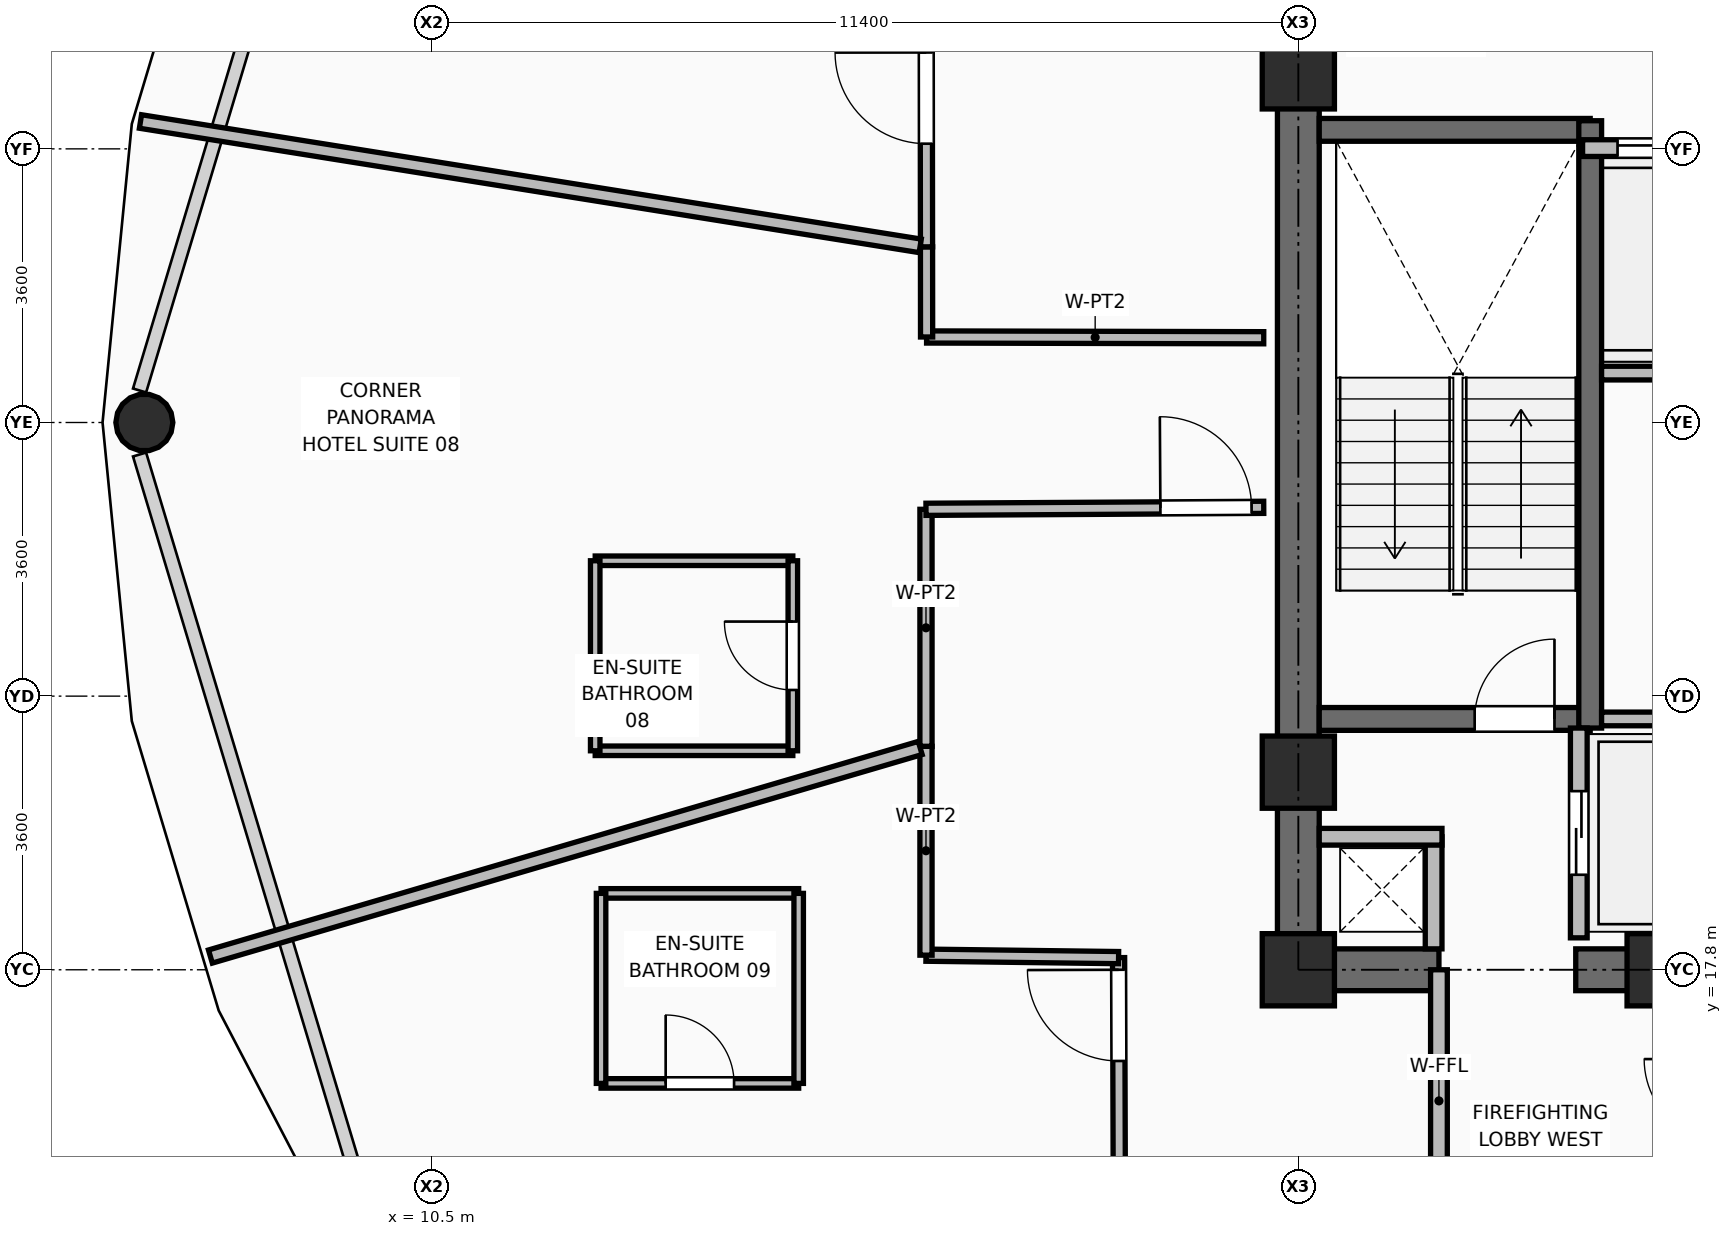
"""IFC4 building model, lengths in metres.
Left out: names, types, materials, properties, quantities, classifications, styles, units other than length and angle.
Written with IfcOpenShell. Run it as: python <this file> out.ifc"""

import sys

from ifc_helpers import new_model, si_unit, direction, frame, frame_2d, origin, origin_2d, place, context, subcontext, project, spatial, rectangle, hollow_circle, extrude, element, fill, save


model = new_model("IFC4")
c1 = context("Model", 3, precision=1e-05, world=origin(), true_north=direction((0.0, 1.0)))
c2 = subcontext(c1, "Body", "Model", "MODEL_VIEW")
j1 = project(units=[si_unit("LENGTHUNIT", "METRE"), si_unit("PLANEANGLEUNIT", "RADIAN")], contexts=[c1])
p1 = place(None, origin())
s1 = spatial("IfcSite", under=j1, at=p1, CompositionType="ELEMENT")
p2 = place(p1, origin())
s2 = spatial("IfcBuilding", under=s1, at=p2, CompositionType="ELEMENT")
p3 = place(p2, frame((0.0, 0.0, 157.2)))
s3 = spatial("IfcBuildingStorey", under=s2, at=p3, CompositionType="ELEMENT", Elevation=157.2)
for number, where, z_axis, x_axis in (
    (1, (21.9, 17.8, 0.0), (0.0, 0.0, 1.0), (1.0, 0.0, 0.0)),
    (2, (26.7, 17.8, 0.0), (0.0, 0.0, 1.0), (1.0, 0.0, 0.0)),
    (3, (21.9, 20.4, 0.0), (0.0, 0.0, 1.0), (1.0, 0.0, 0.0)),
    (4, (21.9, 29.6, 0.0), (0.0, 0.0, 1.0), (1.0, 0.0, 0.0)),
):
    element("IfcColumn", number, at=place(p3, frame(where, z_axis=z_axis, x_axis=x_axis)), inside=s3, PredefinedType="COLUMN", context=c2, shape_type="SweptSolid", body=[
        extrude(rectangle(XDim=0.95, YDim=0.95, at=origin_2d()), origin(), (0.0, 0.0, 1.0), 3.75),
    ])
p4 = place(p3, frame((6.717, 25.0, 0.0), z_axis=(0.0, 0.0, 1.0), x_axis=(1.0, 0.0, 0.0)))
e5 = element("IfcColumn", 5, at=p4, inside=s3, PredefinedType="COLUMN", context=c2, shape_type="SweptSolid", body=[
    extrude(hollow_circle(Radius=0.375, WallThickness=0.035, at=origin_2d()), origin(), (0.0, 0.0, 1.0), 3.57),
])
p5 = place(p3, frame((21.625, 17.8, 0.0), z_axis=(0.0, 0.0, 1.0), x_axis=(1.0, 0.0, 0.0)))
e6 = element("IfcWall", 6, at=p5, inside=s3, PredefinedType="SHEAR", context=c2, shape_type="SweptSolid", body=[
    extrude(rectangle(XDim=2.125, YDim=0.55, at=frame_2d((1.062, 0.0))), origin(), (0.0, 0.0, 1.0), 3.57),
])
p6 = place(p3, frame((25.55, 17.8, 0.0), z_axis=(0.0, 0.0, 1.0), x_axis=(1.0, 0.0, 0.0)))
e7 = element("IfcWall", 7, at=p6, inside=s3, PredefinedType="SHEAR", context=c2, shape_type="SweptSolid", body=[
    extrude(rectangle(XDim=6.9, YDim=0.55, at=frame_2d((3.45, 0.0))), origin(), (0.0, 0.0, 1.0), 3.57),
])
p7 = place(p3, frame((21.9, 18.075, 0.0), z_axis=(0.0, 0.0, 1.0), x_axis=(0.0, 1.0, 0.0)))
e8 = element("IfcWall", 8, at=p7, inside=s3, PredefinedType="SHEAR", context=c2, shape_type="SweptSolid", body=[
    extrude(rectangle(XDim=14.1, YDim=0.55, at=frame_2d((7.05, 0.0))), origin(), (0.0, 0.0, 1.0), 3.57),
])
p8 = place(p3, frame((22.175, 21.1, 0.0), z_axis=(0.0, 0.0, 1.0), x_axis=(1.0, 0.0, 0.0)))
e9 = element("IfcWall", 9, at=p8, inside=s3, PredefinedType="SHEAR", context=c2, shape_type="SweptSolid", body=[
    extrude(rectangle(XDim=3.565, YDim=0.3, at=frame_2d((1.782, 0.0))), origin(), (0.0, 0.0, 1.0), 3.57),
])
p9 = place(p8, frame((2.045, 0.0, 0.0)))
e10 = element("IfcOpeningElement", 10, at=p9, cuts=e9, PredefinedType="OPENING", context=c2, shape_type="SweptSolid", body=[
    extrude(rectangle(XDim=1.05, YDim=2.1, at=frame_2d((0.525, 1.05))), frame((0.0, 0.16, 0.0), z_axis=(0.0, -1.0, 0.0), x_axis=(1.0, 0.0, 0.0)), (0.0, 0.0, 1.0), 0.32),
])
p10 = place(p3, frame((22.175, 28.85, 0.0), z_axis=(0.0, 0.0, 1.0), x_axis=(1.0, 0.0, 0.0)))
e11 = element("IfcWall", 11, at=p10, inside=s3, PredefinedType="SHEAR", context=c2, shape_type="SweptSolid", body=[
    extrude(rectangle(XDim=3.565, YDim=0.3, at=frame_2d((1.782, 0.0))), origin(), (0.0, 0.0, 1.0), 3.57),
])
p11 = place(p3, frame((25.74, 20.98, 0.0), z_axis=(0.0, 0.0, 1.0), x_axis=(0.0, 1.0, 0.0)))
e12 = element("IfcWall", 12, at=p11, inside=s3, PredefinedType="SHEAR", context=c2, shape_type="SweptSolid", body=[
    extrude(rectangle(XDim=7.99, YDim=0.3, at=frame_2d((3.995, 0.0))), origin(), (0.0, 0.0, 1.0), 3.57),
])
p12 = place(p3, frame((23.68, 18.075, 0.0), z_axis=(0.0, 0.0, 1.0), x_axis=(0.0, 1.0, 0.0)))
e13 = element("IfcWall", 13, at=p12, inside=s3, PredefinedType="PARTITIONING", context=c2, shape_type="SweptSolid", body=[
    extrude(rectangle(XDim=1.475, YDim=0.22, at=frame_2d((0.738, 0.0))), origin(), (0.0, 0.0, 1.0), 3.55),
])
p13 = place(p3, frame((22.175, 19.55, 0.0), z_axis=(0.0, 0.0, 1.0), x_axis=(1.0, 0.0, 0.0)))
e14 = element("IfcWall", 14, at=p13, inside=s3, PredefinedType="PARTITIONING", context=c2, shape_type="SweptSolid", body=[
    extrude(rectangle(XDim=1.615, YDim=0.22, at=frame_2d((0.808, 0.0))), origin(), (0.0, 0.0, 1.0), 2.595),
])
p14 = place(p3, frame((25.59, 18.22, 0.0), z_axis=(0.0, 0.0, 1.0), x_axis=(0.0, 1.0, 0.0)))
e15 = element("IfcWall", 15, at=p14, inside=s3, PredefinedType="PARTITIONING", context=c2, shape_type="SweptSolid", body=[
    extrude(rectangle(XDim=2.76, YDim=0.22, at=frame_2d((1.38, 0.0))), origin(), (0.0, 0.0, 1.0), 3.55),
])
p15 = place(p14, frame((0.83, 0.0, 0.0)))
e16 = element("IfcOpeningElement", 16, at=p15, cuts=e15, PredefinedType="OPENING", context=c2, shape_type="SweptSolid", body=[
    extrude(rectangle(XDim=1.1, YDim=2.2, at=frame_2d((0.55, 1.1))), frame((0.0, 0.12, 0.0), z_axis=(0.0, -1.0, 0.0), x_axis=(1.0, 0.0, 0.0)), (0.0, 0.0, 1.0), 0.24),
])
p16 = place(p3, frame((25.64, 28.61, 0.0), z_axis=(0.0, 0.0, 1.0), x_axis=(1.0, 0.0, 0.0)))
e17 = element("IfcWall", 17, at=p16, inside=s3, PredefinedType="PARTITIONING", context=c2, shape_type="SweptSolid", body=[
    extrude(rectangle(XDim=2.02, YDim=0.22, at=frame_2d((1.01, 0.0))), origin(), (0.0, 0.0, 1.0), 3.55),
])
p17 = place(p16, frame((0.46, 0.0, 0.0)))
e18 = element("IfcOpeningElement", 18, at=p17, cuts=e17, PredefinedType="OPENING", context=c2, shape_type="SweptSolid", body=[
    extrude(rectangle(XDim=1.1, YDim=2.2, at=frame_2d((0.55, 1.1))), frame((0.0, 0.12, 0.0), z_axis=(0.0, -1.0, 0.0), x_axis=(1.0, 0.0, 0.0)), (0.0, 0.0, 1.0), 0.24),
])
for number, where, z_axis, x_axis in (
    (19, (25.89, 21.1, 0.0), (0.0, 0.0, 1.0), (1.0, 0.0, 0.0)),
    (20, (25.89, 25.65, 0.0), (0.0, 0.0, 1.0), (1.0, 0.0, 0.0)),
):
    element("IfcWall", number, at=place(p3, frame(where, z_axis=z_axis, x_axis=x_axis)), inside=s3, PredefinedType="PARTITIONING", context=c2, shape_type="SweptSolid", body=[
        extrude(rectangle(XDim=1.7, YDim=0.18, at=frame_2d((0.85, 0.0))), origin(), (0.0, 0.0, 1.0), 3.55),
    ])
p18 = place(p3, frame((23.75, 14.35, 0.0), z_axis=(0.0, 0.0, 1.0), x_axis=(0.0, 1.0, 0.0)))
e21 = element("IfcWall", 21, at=p18, inside=s3, PredefinedType="PARTITIONING", context=c2, shape_type="SweptSolid", body=[
    extrude(rectangle(XDim=3.45, YDim=0.22, at=frame_2d((1.725, 0.0))), origin(), (0.0, 0.0, 1.0), 3.006),
])
p19 = place(p3, frame((21.445, 26.115, 0.0), z_axis=(0.0, 0.0, 1.0), x_axis=(-0.999997454189, 0.002256460959, 0.0)))
e22 = element("IfcWall", 22, at=p19, inside=s3, PredefinedType="PARTITIONING", context=c2, shape_type="SweptSolid", body=[
    extrude(rectangle(XDim=4.436, YDim=0.16, at=frame_2d((2.218, 0.0))), origin(), (0.0, 0.0, 1.0), 2.595),
])
p20 = place(p3, frame((17.009, 26.125, 0.0), z_axis=(0.0, 0.0, 1.0), x_axis=(-0.00082338383, 0.999999661019, 0.0)))
e23 = element("IfcWall", 23, at=p20, inside=s3, PredefinedType="PARTITIONING", context=c2, shape_type="SweptSolid", body=[
    extrude(rectangle(XDim=1.186, YDim=0.16, at=frame_2d((0.593, 0.0))), origin(), (0.0, 0.0, 1.0), 3.55),
])
p21 = place(p3, frame((17.008, 27.311, 0.0), z_axis=(0.0, 0.0, 1.0), x_axis=(-0.001309879116, 0.999999142108, 0.0)))
e24 = element("IfcWall", 24, at=p21, inside=s3, PredefinedType="PARTITIONING", context=c2, shape_type="SweptSolid", body=[
    extrude(rectangle(XDim=3.914, YDim=0.16, at=frame_2d((1.957, 0.0))), origin(), (0.0, 0.0, 1.0), 3.55),
])
p22 = place(p21, frame((1.357, 0.0, 0.0)))
e25 = element("IfcOpeningElement", 25, at=p22, cuts=e24, PredefinedType="OPENING", context=c2, shape_type="SweptSolid", body=[
    extrude(rectangle(XDim=1.2, YDim=2.1, at=frame_2d((0.6, 1.05))), frame((0.0, 0.09, 0.0), z_axis=(0.0, -1.0, 0.0), x_axis=(1.0, 0.0, 0.0)), (0.0, 0.0, 1.0), 0.18),
])
p23 = place(p3, frame((19.548, 13.809, 0.0), z_axis=(0.0, 0.0, 1.0), x_axis=(-0.00317608091, 0.999994956242, 0.0)))
e26 = element("IfcWall", 26, at=p23, inside=s3, PredefinedType="PARTITIONING", context=c2, shape_type="SweptSolid", body=[
    extrude(rectangle(XDim=4.151, YDim=0.16, at=frame_2d((2.075, 0.0))), origin(), (0.0, 0.0, 1.0), 3.006),
])
p24 = place(p23, frame((2.791, 0.0, 0.0)))
e27 = element("IfcOpeningElement", 27, at=p24, cuts=e26, PredefinedType="OPENING", context=c2, shape_type="SweptSolid", body=[
    extrude(rectangle(XDim=1.2, YDim=2.1, at=frame_2d((0.6, 1.05))), frame((0.0, 0.09, 0.0), z_axis=(0.0, -1.0, 0.0), x_axis=(1.0, 0.0, 0.0)), (0.0, 0.0, 1.0), 0.18),
])
p25 = place(p3, frame((19.535, 17.96, 0.0), z_axis=(0.0, 0.0, 1.0), x_axis=(-0.999920356619, 0.01262063462, 0.0)))
e28 = element("IfcWall", 28, at=p25, inside=s3, PredefinedType="PARTITIONING", context=c2, shape_type="SweptSolid", body=[
    extrude(rectangle(XDim=2.534, YDim=0.16, at=frame_2d((1.267, 0.0))), origin(), (0.0, 0.0, 1.0), 3.55),
])
p26 = place(p3, frame((17.001, 17.992, 0.0), z_axis=(0.0, 0.0, 1.0), x_axis=(0.0, 1.0, 0.0)))
e29 = element("IfcWall", 29, at=p26, inside=s3, PredefinedType="PARTITIONING", context=c2, shape_type="SweptSolid", body=[
    extrude(rectangle(XDim=2.748, YDim=0.16, at=frame_2d((1.374, 0.0))), origin(), (0.0, 0.0, 1.0), 3.55),
])
p27 = place(p3, frame((17.001, 20.74, 0.0), z_axis=(0.0, 0.0, 1.0), x_axis=(0.0, 1.0, 0.0)))
e30 = element("IfcWall", 30, at=p27, inside=s3, PredefinedType="PARTITIONING", context=c2, shape_type="SweptSolid", body=[
    extrude(rectangle(XDim=3.118, YDim=0.16, at=frame_2d((1.559, 0.0))), origin(), (0.0, 0.0, 1.0), 3.006),
])
p28 = place(p3, frame((17.001, 23.858, 0.0), z_axis=(0.0, 0.0, 1.0), x_axis=(0.999982724113, 0.005878050403, 0.0)))
e31 = element("IfcWall", 31, at=p28, inside=s3, PredefinedType="PARTITIONING", context=c2, shape_type="SweptSolid", body=[
    extrude(rectangle(XDim=4.444, YDim=0.16, at=frame_2d((2.222, 0.0))), origin(), (0.0, 0.0, 1.0), 2.595),
])
p29 = place(p28, frame((3.084, 0.0, 0.0)))
e32 = element("IfcOpeningElement", 32, at=p29, cuts=e31, PredefinedType="OPENING", context=c2, shape_type="SweptSolid", body=[
    extrude(rectangle(XDim=1.2, YDim=2.1, at=frame_2d((0.6, 1.05))), frame((0.0, 0.09, 0.0), z_axis=(0.0, -1.0, 0.0), x_axis=(1.0, 0.0, 0.0)), (0.0, 0.0, 1.0), 0.18),
])
p30 = place(p3, frame((16.925, 27.324, 0.0), z_axis=(0.0, 0.0, 1.0), x_axis=(-0.987522476436, 0.157478120811, 0.0)))
e33 = element("IfcWall", 33, at=p30, inside=s3, PredefinedType="PARTITIONING", context=c2, shape_type="SweptSolid", body=[
    extrude(rectangle(XDim=10.389, YDim=0.18, at=frame_2d((5.194, 0.0))), origin(), (0.0, 0.0, 1.0), 2.852),
])
p31 = place(p3, frame((16.925, 20.718, 0.0), z_axis=(0.0, 0.0, 1.0), x_axis=(-0.959446138816, -0.2818920125, 0.0)))
e34 = element("IfcWall", 34, at=p31, inside=s3, PredefinedType="PARTITIONING", context=c2, shape_type="SweptSolid", body=[
    extrude(rectangle(XDim=9.734, YDim=0.18, at=frame_2d((4.867, 0.0))), origin(), (0.0, 0.0, 1.0), 2.852),
])
p32 = place(p3, frame((12.649, 20.681, 0.0), z_axis=(0.0, 0.0, 1.0), x_axis=(1.0, 0.0, 0.0)))
e35 = element("IfcWall", 35, at=p32, inside=s3, PredefinedType="PARTITIONING", context=c2, shape_type="SweptSolid", body=[
    extrude(rectangle(XDim=2.6, YDim=0.125, at=frame_2d((1.3, 0.0))), origin(), (0.0, 0.0, 1.0), 3.55),
])
p33 = place(p3, frame((12.649, 23.181, 0.0), z_axis=(0.0, 0.0, 1.0), x_axis=(1.0, 0.0, 0.0)))
e36 = element("IfcWall", 36, at=p33, inside=s3, PredefinedType="PARTITIONING", context=c2, shape_type="SweptSolid", body=[
    extrude(rectangle(XDim=2.6, YDim=0.125, at=frame_2d((1.3, 0.0))), origin(), (0.0, 0.0, 1.0), 3.006),
])
p34 = place(p3, frame((12.649, 20.681, 0.0), z_axis=(0.0, 0.0, 1.0), x_axis=(0.0, 1.0, 0.0)))
e37 = element("IfcWall", 37, at=p34, inside=s3, PredefinedType="PARTITIONING", context=c2, shape_type="SweptSolid", body=[
    extrude(rectangle(XDim=2.5, YDim=0.125, at=frame_2d((1.25, 0.0))), origin(), (0.0, 0.0, 1.0), 3.006),
])
p35 = place(p3, frame((15.249, 20.681, 0.0), z_axis=(0.0, 0.0, 1.0), x_axis=(0.0, 1.0, 0.0)))
e38 = element("IfcWall", 38, at=p35, inside=s3, PredefinedType="PARTITIONING", context=c2, shape_type="SweptSolid", body=[
    extrude(rectangle(XDim=2.5, YDim=0.125, at=frame_2d((1.25, 0.0))), origin(), (0.0, 0.0, 1.0), 3.006),
])
p36 = place(p35, frame((0.8, 0.0, 0.0)))
e39 = element("IfcOpeningElement", 39, at=p36, cuts=e38, PredefinedType="OPENING", context=c2, shape_type="SweptSolid", body=[
    extrude(rectangle(XDim=0.9, YDim=2.1, at=frame_2d((0.45, 1.05))), frame((0.0, 0.073, 0.0), z_axis=(0.0, -1.0, 0.0), x_axis=(1.0, 0.0, 0.0)), (0.0, 0.0, 1.0), 0.145),
])
p37 = place(p3, frame((12.726, 16.305, 0.0), z_axis=(0.0, 0.0, 1.0), x_axis=(1.0, 0.0, 0.0)))
e40 = element("IfcWall", 40, at=p37, inside=s3, PredefinedType="PARTITIONING", context=c2, shape_type="SweptSolid", body=[
    extrude(rectangle(XDim=2.6, YDim=0.125, at=frame_2d((1.3, 0.0))), origin(), (0.0, 0.0, 1.0), 3.55),
])
p38 = place(p37, frame((0.85, 0.0, 0.0)))
e41 = element("IfcOpeningElement", 41, at=p38, cuts=e40, PredefinedType="OPENING", context=c2, shape_type="SweptSolid", body=[
    extrude(rectangle(XDim=0.9, YDim=2.1, at=frame_2d((0.45, 1.05))), frame((0.0, 0.073, 0.0), z_axis=(0.0, -1.0, 0.0), x_axis=(1.0, 0.0, 0.0)), (0.0, 0.0, 1.0), 0.145),
])
p39 = place(p3, frame((12.726, 18.805, 0.0), z_axis=(0.0, 0.0, 1.0), x_axis=(1.0, 0.0, 0.0)))
e42 = element("IfcWall", 42, at=p39, inside=s3, PredefinedType="PARTITIONING", context=c2, shape_type="SweptSolid", body=[
    extrude(rectangle(XDim=2.6, YDim=0.125, at=frame_2d((1.3, 0.0))), origin(), (0.0, 0.0, 1.0), 3.55),
])
for number, where, z_axis, x_axis in (
    (43, (12.726, 16.305, 0.0), (0.0, 0.0, 1.0), (0.0, 1.0, 0.0)),
    (44, (15.326, 16.305, 0.0), (0.0, 0.0, 1.0), (0.0, 1.0, 0.0)),
):
    element("IfcWall", number, at=place(p3, frame(where, z_axis=z_axis, x_axis=x_axis)), inside=s3, PredefinedType="PARTITIONING", context=c2, shape_type="SweptSolid", body=[
        extrude(rectangle(XDim=2.5, YDim=0.125, at=frame_2d((1.25, 0.0))), origin(), (0.0, 0.0, 1.0), 3.55),
    ])
p40 = place(p9, origin())
e45 = element("IfcDoor", 45, at=p40, inside=s3, OperationType="SINGLE_SWING_RIGHT", PredefinedType="DOOR", context=c2, shape_type="SweptSolid", body=[
    extrude(rectangle(XDim=1.05, YDim=2.1, at=frame_2d((0.525, 1.05))), frame((0.0, 0.025, 0.0), z_axis=(0.0, -1.0, 0.0), x_axis=(1.0, 0.0, 0.0)), (0.0, 0.0, 1.0), 0.05),
])
fill(e10, e45)
p41 = place(p15, origin())
e46 = element("IfcDoor", 46, at=p41, inside=s3, OperationType="DOUBLE_DOOR_SLIDING", PredefinedType="DOOR", context=c2, shape_type="SweptSolid", body=[
    extrude(rectangle(XDim=1.1, YDim=2.2, at=frame_2d((0.55, 1.1))), frame((0.0, 0.025, 0.0), z_axis=(0.0, -1.0, 0.0), x_axis=(1.0, 0.0, 0.0)), (0.0, 0.0, 1.0), 0.05),
])
fill(e16, e46)
p42 = place(p17, origin())
e47 = element("IfcDoor", 47, at=p42, inside=s3, OperationType="DOUBLE_DOOR_SLIDING", PredefinedType="DOOR", context=c2, shape_type="SweptSolid", body=[
    extrude(rectangle(XDim=1.1, YDim=2.2, at=frame_2d((0.55, 1.1))), frame((0.0, 0.025, 0.0), z_axis=(0.0, -1.0, 0.0), x_axis=(1.0, 0.0, 0.0)), (0.0, 0.0, 1.0), 0.05),
])
fill(e18, e47)
p43 = place(p22, origin())
e48 = element("IfcDoor", 48, at=p43, inside=s3, OperationType="SINGLE_SWING_RIGHT", PredefinedType="DOOR", context=c2, shape_type="SweptSolid", body=[
    extrude(rectangle(XDim=1.2, YDim=2.1, at=frame_2d((0.6, 1.05))), frame((0.0, 0.025, 0.0), z_axis=(0.0, -1.0, 0.0), x_axis=(1.0, 0.0, 0.0)), (0.0, 0.0, 1.0), 0.05),
])
fill(e25, e48)
p44 = place(p36, origin())
e49 = element("IfcDoor", 49, at=p44, inside=s3, OperationType="SINGLE_SWING_RIGHT", PredefinedType="DOOR", context=c2, shape_type="SweptSolid", body=[
    extrude(rectangle(XDim=0.9, YDim=2.1, at=frame_2d((0.45, 1.05))), frame((0.0, 0.025, 0.0), z_axis=(0.0, -1.0, 0.0), x_axis=(1.0, 0.0, 0.0)), (0.0, 0.0, 1.0), 0.05),
])
fill(e39, e49)
p45 = place(p29, origin())
e50 = element("IfcDoor", 50, at=p45, inside=s3, OperationType="SINGLE_SWING_LEFT", PredefinedType="DOOR", context=c2, shape_type="SweptSolid", body=[
    extrude(rectangle(XDim=1.2, YDim=2.1, at=frame_2d((0.6, 1.05))), frame((0.0, 0.025, 0.0), z_axis=(0.0, -1.0, 0.0), x_axis=(1.0, 0.0, 0.0)), (0.0, 0.0, 1.0), 0.05),
])
fill(e32, e50)
p46 = place(p38, origin())
e51 = element("IfcDoor", 51, at=p46, inside=s3, OperationType="SINGLE_SWING_LEFT", PredefinedType="DOOR", context=c2, shape_type="SweptSolid", body=[
    extrude(rectangle(XDim=0.9, YDim=2.1, at=frame_2d((0.45, 1.05))), frame((0.0, 0.025, 0.0), z_axis=(0.0, -1.0, 0.0), x_axis=(1.0, 0.0, 0.0)), (0.0, 0.0, 1.0), 0.05),
])
fill(e41, e51)
p47 = place(p24, origin())
e52 = element("IfcDoor", 52, at=p47, inside=s3, OperationType="SINGLE_SWING_RIGHT", PredefinedType="DOOR", context=c2, shape_type="SweptSolid", body=[
    extrude(rectangle(XDim=1.2, YDim=2.1, at=frame_2d((0.6, 1.05))), frame((0.0, 0.025, 0.0), z_axis=(0.0, -1.0, 0.0), x_axis=(1.0, 0.0, 0.0)), (0.0, 0.0, 1.0), 0.05),
])
fill(e27, e52)
save(model, sys.argv[1])
